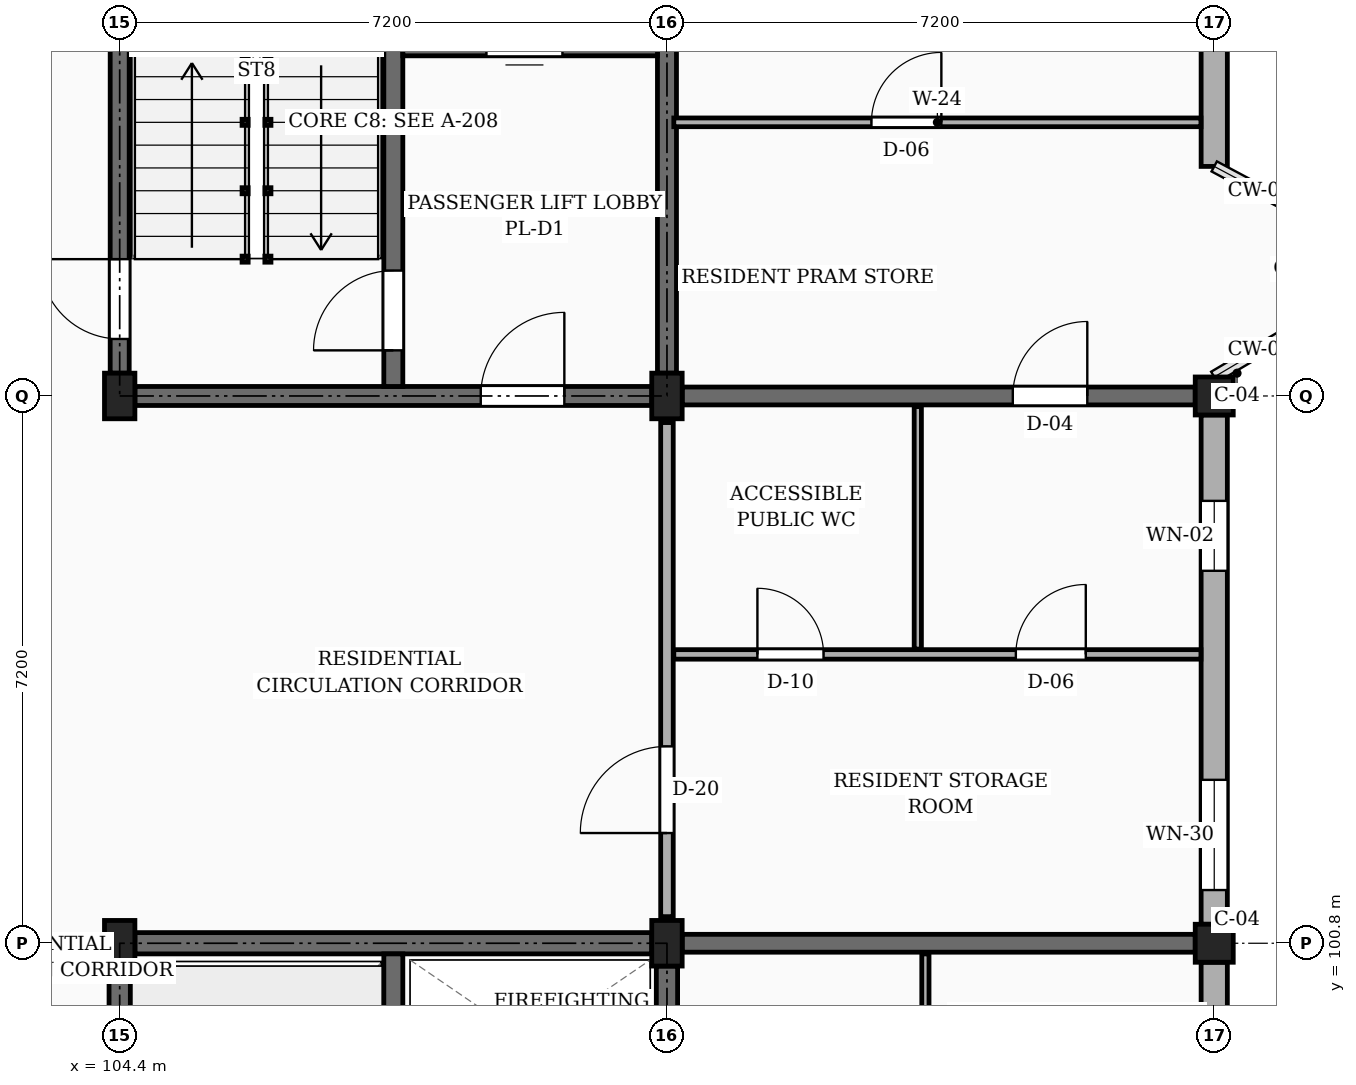
"""IFC4 building model, lengths in metres.
Left out: names, types, materials, properties, quantities, classifications, styles, units other than length and angle.
Written with IfcOpenShell. Run it as: python <this file> out.ifc"""

import sys

from ifc_helpers import new_model, si_unit, direction, frame, frame_2d, origin, origin_2d, place, context, subcontext, project, spatial, rectangle, extrude, element, fill, save


model = new_model("IFC4")
c1 = context("Model", 3, precision=1e-05, world=origin(), true_north=direction((0.0, 1.0)))
c2 = subcontext(c1, "Body", "Model", "MODEL_VIEW")
j1 = project(units=[si_unit("LENGTHUNIT", "METRE"), si_unit("PLANEANGLEUNIT", "RADIAN")], contexts=[c1])
p1 = place(None, origin())
s1 = spatial("IfcSite", under=j1, at=p1, CompositionType="ELEMENT")
p2 = place(p1, origin())
s2 = spatial("IfcBuilding", under=s1, at=p2, CompositionType="ELEMENT")
p3 = place(p2, frame((0.0, 0.0, 23.4)))
s3 = spatial("IfcBuildingStorey", under=s2, at=p3, CompositionType="ELEMENT", Elevation=23.4)
for number, where, z_axis, x_axis in (
    (1, (104.4, 100.8, 0.0), (0.0, 0.0, 1.0), (1.0, 0.0, 0.0)),
    (2, (104.4, 108.0, 0.0), (0.0, 0.0, 1.0), (1.0, 0.0, 0.0)),
    (3, (111.6, 100.8, 0.0), (0.0, 0.0, 1.0), (1.0, 0.0, 0.0)),
    (4, (111.6, 108.0, 0.0), (0.0, 0.0, 1.0), (1.0, 0.0, 0.0)),
):
    element("IfcColumn", number, at=place(p3, frame(where, z_axis=z_axis, x_axis=x_axis)), inside=s3, PredefinedType="COLUMN", context=c2, shape_type="SweptSolid", body=[
        extrude(rectangle(XDim=0.4, YDim=0.6, at=origin_2d()), origin(), (0.0, 0.0, 1.0), 3.15),
    ])
for number, where, z_axis, x_axis in (
    (5, (118.8, 100.8, 0.0), (0.0, 0.0, 1.0), (1.0, 0.0, 0.0)),
    (6, (118.8, 108.0, 0.0), (0.0, 0.0, 1.0), (1.0, 0.0, 0.0)),
):
    element("IfcColumn", number, at=place(p3, frame(where, z_axis=z_axis, x_axis=x_axis)), inside=s3, PredefinedType="COLUMN", context=c2, shape_type="SweptSolid", body=[
        extrude(rectangle(XDim=0.5, YDim=0.5, at=origin_2d()), origin(), (0.0, 0.0, 1.0), 3.15),
    ])
p4 = place(p3, frame((111.8, 100.8, 0.0), z_axis=(0.0, 0.0, 1.0), x_axis=(1.0, 0.0, 0.0)))
e7 = element("IfcWall", 7, at=p4, inside=s3, PredefinedType="SOLIDWALL", context=c2, shape_type="SweptSolid", body=[
    extrude(rectangle(XDim=6.75, YDim=0.235, at=frame_2d((3.375, 0.0))), origin(), (0.0, 0.0, 1.0), 2.19),
])
p5 = place(p3, frame((111.8, 108.0, 0.0), z_axis=(0.0, 0.0, 1.0), x_axis=(1.0, 0.0, 0.0)))
e8 = element("IfcWall", 8, at=p5, inside=s3, PredefinedType="SOLIDWALL", context=c2, shape_type="SweptSolid", body=[
    extrude(rectangle(XDim=6.75, YDim=0.235, at=frame_2d((3.375, 0.0))), origin(), (0.0, 0.0, 1.0), 2.19),
])
p6 = place(p5, frame((4.35, 0.0, 0.0)))
e9 = element("IfcOpeningElement", 9, at=p6, cuts=e8, PredefinedType="OPENING", context=c2, shape_type="SweptSolid", body=[
    extrude(rectangle(XDim=0.98, YDim=2.12, at=frame_2d((0.49, 1.06))), frame((0.0, 0.127, 0.0), z_axis=(0.0, -1.0, 0.0), x_axis=(1.0, 0.0, 0.0)), (0.0, 0.0, 1.0), 0.255),
])
p7 = place(p3, frame((118.8, 93.85, 0.0), z_axis=(0.0, 0.0, 1.0), x_axis=(0.0, 1.0, 0.0)))
e10 = element("IfcWall", 10, at=p7, inside=s3, PredefinedType="SOLIDWALL", context=c2, shape_type="SweptSolid", body=[
    extrude(rectangle(XDim=6.7, YDim=0.345, at=frame_2d((3.35, 0.0))), origin(), (0.0, 0.0, 1.0), 2.46),
])
p8 = place(p7, frame((0.45, 0.0, 0.78)))
e11 = element("IfcOpeningElement", 11, at=p8, cuts=e10, PredefinedType="OPENING", context=c2, shape_type="SweptSolid", body=[
    extrude(rectangle(XDim=1.25, YDim=1.44, at=frame_2d((0.625, 0.72))), frame((0.0, 0.183, 0.0), z_axis=(0.0, -1.0, 0.0), x_axis=(1.0, 0.0, 0.0)), (0.0, 0.0, 1.0), 0.365),
])
p9 = place(p7, frame((4.65, 0.0, 0.78)))
e12 = element("IfcOpeningElement", 12, at=p9, cuts=e10, PredefinedType="OPENING", context=c2, shape_type="SweptSolid", body=[
    extrude(rectangle(XDim=1.45, YDim=1.44, at=frame_2d((0.725, 0.72))), frame((0.0, 0.183, 0.0), z_axis=(0.0, -1.0, 0.0), x_axis=(1.0, 0.0, 0.0)), (0.0, 0.0, 1.0), 0.365),
])
p10 = place(p3, frame((118.8, 101.05, 0.0), z_axis=(0.0, 0.0, 1.0), x_axis=(0.0, 1.0, 0.0)))
e13 = element("IfcWall", 13, at=p10, inside=s3, PredefinedType="SOLIDWALL", context=c2, shape_type="SweptSolid", body=[
    extrude(rectangle(XDim=6.7, YDim=0.345, at=frame_2d((3.35, 0.0))), origin(), (0.0, 0.0, 1.0), 2.46),
])
p11 = place(p10, frame((0.45, 0.0, 0.78)))
e14 = element("IfcOpeningElement", 14, at=p11, cuts=e13, PredefinedType="OPENING", context=c2, shape_type="SweptSolid", body=[
    extrude(rectangle(XDim=1.45, YDim=1.44, at=frame_2d((0.725, 0.72))), frame((0.0, 0.183, 0.0), z_axis=(0.0, -1.0, 0.0), x_axis=(1.0, 0.0, 0.0)), (0.0, 0.0, 1.0), 0.365),
])
p12 = place(p10, frame((4.65, 0.0, 0.78)))
e15 = element("IfcOpeningElement", 15, at=p12, cuts=e13, PredefinedType="OPENING", context=c2, shape_type="SweptSolid", body=[
    extrude(rectangle(XDim=0.92, YDim=1.15, at=frame_2d((0.46, 0.575))), frame((0.0, 0.183, 0.0), z_axis=(0.0, -1.0, 0.0), x_axis=(1.0, 0.0, 0.0)), (0.0, 0.0, 1.0), 0.365),
])
p13 = place(p3, frame((118.8, 111.02, 0.0), z_axis=(0.0, 0.0, 1.0), x_axis=(0.0, 1.0, 0.0)))
e16 = element("IfcWall", 16, at=p13, inside=s3, PredefinedType="SOLIDWALL", context=c2, shape_type="SweptSolid", body=[
    extrude(rectangle(XDim=3.93, YDim=0.345, at=frame_2d((1.965, 0.0))), origin(), (0.0, 0.0, 1.0), 2.46),
])
p14 = place(p13, frame((1.74, 0.0, 0.78)))
e17 = element("IfcOpeningElement", 17, at=p14, cuts=e16, PredefinedType="OPENING", context=c2, shape_type="SweptSolid", body=[
    extrude(rectangle(XDim=0.92, YDim=1.15, at=frame_2d((0.46, 0.575))), frame((0.0, 0.183, 0.0), z_axis=(0.0, -1.0, 0.0), x_axis=(1.0, 0.0, 0.0)), (0.0, 0.0, 1.0), 0.365),
])
p15 = place(p3, frame((104.4, 93.9, 0.0), z_axis=(0.0, 0.0, 1.0), x_axis=(0.0, 1.0, 0.0)))
e18 = element("IfcWall", 18, at=p15, inside=s3, PredefinedType="SHEAR", context=c2, shape_type="SweptSolid", body=[
    extrude(rectangle(XDim=6.6, YDim=0.28, at=frame_2d((3.3, 0.0))), origin(), (0.0, 0.0, 1.0), 2.89),
])
p16 = place(p15, frame((0.45, 0.0, 0.0)))
e19 = element("IfcOpeningElement", 19, at=p16, cuts=e18, PredefinedType="OPENING", context=c2, shape_type="SweptSolid", body=[
    extrude(rectangle(XDim=1.05, YDim=2.15, at=frame_2d((0.525, 1.075))), frame((0.0, 0.15, 0.0), z_axis=(0.0, -1.0, 0.0), x_axis=(1.0, 0.0, 0.0)), (0.0, 0.0, 1.0), 0.3),
])
p17 = place(p3, frame((104.6, 100.8, 0.0), z_axis=(0.0, 0.0, 1.0), x_axis=(1.0, 0.0, 0.0)))
e20 = element("IfcWall", 20, at=p17, inside=s3, PredefinedType="SHEAR", context=c2, shape_type="SweptSolid", body=[
    extrude(rectangle(XDim=6.8, YDim=0.28, at=frame_2d((3.4, 0.0))), origin(), (0.0, 0.0, 1.0), 2.89),
])
p18 = place(p3, frame((111.6, 93.9, 0.0), z_axis=(0.0, 0.0, 1.0), x_axis=(0.0, 1.0, 0.0)))
e21 = element("IfcWall", 21, at=p18, inside=s3, PredefinedType="SHEAR", context=c2, shape_type="SweptSolid", body=[
    extrude(rectangle(XDim=6.6, YDim=0.28, at=frame_2d((3.3, 0.0))), origin(), (0.0, 0.0, 1.0), 2.89),
])
p19 = place(p3, frame((108.0, 93.74, 0.0), z_axis=(0.0, 0.0, 1.0), x_axis=(0.0, 1.0, 0.0)))
e22 = element("IfcWall", 22, at=p19, inside=s3, PredefinedType="SHEAR", context=c2, shape_type="SweptSolid", body=[
    extrude(rectangle(XDim=6.92, YDim=0.25, at=frame_2d((3.46, 0.0))), origin(), (0.0, 0.0, 1.0), 2.89),
])
p20 = place(p19, frame((0.46, 0.0, 0.0)))
e23 = element("IfcOpeningElement", 23, at=p20, cuts=e22, PredefinedType="OPENING", context=c2, shape_type="SweptSolid", body=[
    extrude(rectangle(XDim=1.05, YDim=2.15, at=frame_2d((0.525, 1.075))), frame((0.0, 0.135, 0.0), z_axis=(0.0, -1.0, 0.0), x_axis=(1.0, 0.0, 0.0)), (0.0, 0.0, 1.0), 0.27),
])
p21 = place(p3, frame((104.4, 108.3, 0.0), z_axis=(0.0, 0.0, 1.0), x_axis=(0.0, 1.0, 0.0)))
e24 = element("IfcWall", 24, at=p21, inside=s3, PredefinedType="SHEAR", context=c2, shape_type="SweptSolid", body=[
    extrude(rectangle(XDim=6.6, YDim=0.25, at=frame_2d((3.3, 0.0))), origin(), (0.0, 0.0, 1.0), 2.89),
])
p22 = place(p21, frame((0.45, 0.0, 0.0)))
e25 = element("IfcOpeningElement", 25, at=p22, cuts=e24, PredefinedType="OPENING", context=c2, shape_type="SweptSolid", body=[
    extrude(rectangle(XDim=1.05, YDim=2.15, at=frame_2d((0.525, 1.075))), frame((0.0, 0.135, 0.0), z_axis=(0.0, -1.0, 0.0), x_axis=(1.0, 0.0, 0.0)), (0.0, 0.0, 1.0), 0.27),
])
p23 = place(p3, frame((111.6, 108.3, 0.0), z_axis=(0.0, 0.0, 1.0), x_axis=(0.0, 1.0, 0.0)))
e26 = element("IfcWall", 26, at=p23, inside=s3, PredefinedType="SHEAR", context=c2, shape_type="SweptSolid", body=[
    extrude(rectangle(XDim=6.6, YDim=0.25, at=frame_2d((3.3, 0.0))), origin(), (0.0, 0.0, 1.0), 2.89),
])
p24 = place(p3, frame((104.6, 108.0, 0.0), z_axis=(0.0, 0.0, 1.0), x_axis=(1.0, 0.0, 0.0)))
e27 = element("IfcWall", 27, at=p24, inside=s3, PredefinedType="SHEAR", context=c2, shape_type="SweptSolid", body=[
    extrude(rectangle(XDim=6.8, YDim=0.25, at=frame_2d((3.4, 0.0))), origin(), (0.0, 0.0, 1.0), 2.89),
])
p25 = place(p24, frame((4.55, 0.0, 0.0)))
e28 = element("IfcOpeningElement", 28, at=p25, cuts=e27, PredefinedType="OPENING", context=c2, shape_type="SweptSolid", body=[
    extrude(rectangle(XDim=1.1, YDim=2.15, at=frame_2d((0.55, 1.075))), frame((0.0, 0.135, 0.0), z_axis=(0.0, -1.0, 0.0), x_axis=(1.0, 0.0, 0.0)), (0.0, 0.0, 1.0), 0.27),
])
p26 = place(p3, frame((108.0, 108.125, 0.0), z_axis=(0.0, 0.0, 1.0), x_axis=(0.0, 1.0, 0.0)))
e29 = element("IfcWall", 29, at=p26, inside=s3, PredefinedType="SHEAR", context=c2, shape_type="SweptSolid", body=[
    extrude(rectangle(XDim=6.95, YDim=0.25, at=frame_2d((3.475, 0.0))), origin(), (0.0, 0.0, 1.0), 2.89),
])
p27 = place(p26, frame((0.475, 0.0, 0.0)))
e30 = element("IfcOpeningElement", 30, at=p27, cuts=e29, PredefinedType="OPENING", context=c2, shape_type="SweptSolid", body=[
    extrude(rectangle(XDim=1.05, YDim=2.15, at=frame_2d((0.525, 1.075))), frame((0.0, 0.135, 0.0), z_axis=(0.0, -1.0, 0.0), x_axis=(1.0, 0.0, 0.0)), (0.0, 0.0, 1.0), 0.27),
])
p28 = place(p3, frame((108.125, 112.6, 0.0), z_axis=(0.0, 0.0, 1.0), x_axis=(1.0, 0.0, 0.0)))
e31 = element("IfcWall", 31, at=p28, inside=s3, PredefinedType="SHEAR", context=c2, shape_type="SweptSolid", body=[
    extrude(rectangle(XDim=3.35, YDim=0.25, at=frame_2d((1.675, 0.0))), origin(), (0.0, 0.0, 1.0), 2.89),
])
p29 = place(p28, frame((1.1, 0.0, 0.0)))
e32 = element("IfcOpeningElement", 32, at=p29, cuts=e31, PredefinedType="OPENING", context=c2, shape_type="SweptSolid", body=[
    extrude(rectangle(XDim=1.0, YDim=2.2, at=frame_2d((0.5, 1.1))), frame((0.0, 0.135, 0.0), z_axis=(0.0, -1.0, 0.0), x_axis=(1.0, 0.0, 0.0)), (0.0, 0.0, 1.0), 0.27),
])
p30 = place(p3, frame((111.6, 101.15, 0.0), z_axis=(0.0, 0.0, 1.0), x_axis=(0.0, 1.0, 0.0)))
e33 = element("IfcWall", 33, at=p30, inside=s3, PredefinedType="PARTITIONING", context=c2, shape_type="SweptSolid", body=[
    extrude(rectangle(XDim=6.5, YDim=0.165, at=frame_2d((3.25, 0.0))), origin(), (0.0, 0.0, 1.0), 2.325),
])
p31 = place(p30, frame((1.1, 0.0, 0.0)))
e34 = element("IfcOpeningElement", 34, at=p31, cuts=e33, PredefinedType="OPENING", context=c2, shape_type="SweptSolid", body=[
    extrude(rectangle(XDim=1.14, YDim=2.18, at=frame_2d((0.57, 1.09))), frame((0.0, 0.093, 0.0), z_axis=(0.0, -1.0, 0.0), x_axis=(1.0, 0.0, 0.0)), (0.0, 0.0, 1.0), 0.185),
])
p32 = place(p3, frame((115.0, 96.97, 0.0), z_axis=(0.0, 0.0, 1.0), x_axis=(0.0, 1.0, 0.0)))
e35 = element("IfcWall", 35, at=p32, inside=s3, PredefinedType="PARTITIONING", context=c2, shape_type="SweptSolid", body=[
    extrude(rectangle(XDim=3.69, YDim=0.095, at=frame_2d((1.845, 0.0))), origin(), (0.0, 0.0, 1.0), 2.325),
])
p33 = place(p3, frame((111.69, 104.6, 0.0), z_axis=(0.0, 0.0, 1.0), x_axis=(1.0, 0.0, 0.0)))
e36 = element("IfcWall", 36, at=p33, inside=s3, PredefinedType="PARTITIONING", context=c2, shape_type="SweptSolid", body=[
    extrude(rectangle(XDim=6.935, YDim=0.125, at=frame_2d((3.468, 0.0))), origin(), (0.0, 0.0, 1.0), 2.325),
])
p34 = place(p33, frame((1.1, 0.0, 0.0)))
e37 = element("IfcOpeningElement", 37, at=p34, cuts=e36, PredefinedType="OPENING", context=c2, shape_type="SweptSolid", body=[
    extrude(rectangle(XDim=0.87, YDim=2.05, at=frame_2d((0.435, 1.025))), frame((0.0, 0.073, 0.0), z_axis=(0.0, -1.0, 0.0), x_axis=(1.0, 0.0, 0.0)), (0.0, 0.0, 1.0), 0.145),
])
p35 = place(p33, frame((4.5, 0.0, 0.0)))
e38 = element("IfcOpeningElement", 38, at=p35, cuts=e36, PredefinedType="OPENING", context=c2, shape_type="SweptSolid", body=[
    extrude(rectangle(XDim=0.92, YDim=2.1, at=frame_2d((0.46, 1.05))), frame((0.0, 0.073, 0.0), z_axis=(0.0, -1.0, 0.0), x_axis=(1.0, 0.0, 0.0)), (0.0, 0.0, 1.0), 0.145),
])
p36 = place(p3, frame((114.9, 104.67, 0.0), z_axis=(0.0, 0.0, 1.0), x_axis=(0.0, 1.0, 0.0)))
e39 = element("IfcWall", 39, at=p36, inside=s3, PredefinedType="PARTITIONING", context=c2, shape_type="SweptSolid", body=[
    extrude(rectangle(XDim=3.19, YDim=0.095, at=frame_2d((1.595, 0.0))), origin(), (0.0, 0.0, 1.0), 2.325),
])
p37 = place(p3, frame((111.69, 111.6, 0.0), z_axis=(0.0, 0.0, 1.0), x_axis=(1.0, 0.0, 0.0)))
e40 = element("IfcWall", 40, at=p37, inside=s3, PredefinedType="PARTITIONING", context=c2, shape_type="SweptSolid", body=[
    extrude(rectangle(XDim=6.935, YDim=0.115, at=frame_2d((3.468, 0.0))), origin(), (0.0, 0.0, 1.0), 2.325),
])
p38 = place(p37, frame((2.6, 0.0, 0.0)))
e41 = element("IfcOpeningElement", 41, at=p38, cuts=e40, PredefinedType="OPENING", context=c2, shape_type="SweptSolid", body=[
    extrude(rectangle(XDim=0.92, YDim=2.1, at=frame_2d((0.46, 1.05))), frame((0.0, 0.067, 0.0), z_axis=(0.0, -1.0, 0.0), x_axis=(1.0, 0.0, 0.0)), (0.0, 0.0, 1.0), 0.135),
])
p39 = place(p11, origin())
e42 = element("IfcWindow", 42, at=p39, inside=s3, PartitioningType="SINGLE_PANEL", PredefinedType="WINDOW", context=c2, shape_type="SweptSolid", body=[
    extrude(rectangle(XDim=1.45, YDim=1.44, at=frame_2d((0.725, 0.72))), frame((0.0, 0.03, 0.0), z_axis=(0.0, -1.0, 0.0), x_axis=(1.0, 0.0, 0.0)), (0.0, 0.0, 1.0), 0.06),
])
fill(e14, e42)
p40 = place(p12, origin())
e43 = element("IfcWindow", 43, at=p40, inside=s3, PartitioningType="SINGLE_PANEL", PredefinedType="WINDOW", context=c2, shape_type="SweptSolid", body=[
    extrude(rectangle(XDim=0.92, YDim=1.15, at=frame_2d((0.46, 0.575))), frame((0.0, 0.03, 0.0), z_axis=(0.0, -1.0, 0.0), x_axis=(1.0, 0.0, 0.0)), (0.0, 0.0, 1.0), 0.06),
])
fill(e15, e43)
p41 = place(p22, origin())
e44 = element("IfcDoor", 44, at=p41, inside=s3, OperationType="SINGLE_SWING_RIGHT", PredefinedType="DOOR", context=c2, shape_type="SweptSolid", body=[
    extrude(rectangle(XDim=1.05, YDim=2.15, at=frame_2d((0.525, 1.075))), frame((0.0, 0.025, 0.0), z_axis=(0.0, -1.0, 0.0), x_axis=(1.0, 0.0, 0.0)), (0.0, 0.0, 1.0), 0.05),
])
fill(e25, e44)
p42 = place(p25, frame((1.1, 0.0, 0.0), z_axis=(0.0, 0.0, 1.0), x_axis=(-1.0, 0.0, 0.0)))
e45 = element("IfcDoor", 45, at=p42, inside=s3, OperationType="SINGLE_SWING_RIGHT", PredefinedType="DOOR", context=c2, shape_type="SweptSolid", body=[
    extrude(rectangle(XDim=1.1, YDim=2.15, at=frame_2d((0.55, 1.075))), frame((0.0, 0.025, 0.0), z_axis=(0.0, -1.0, 0.0), x_axis=(1.0, 0.0, 0.0)), (0.0, 0.0, 1.0), 0.05),
])
fill(e28, e45)
p43 = place(p27, origin())
e46 = element("IfcDoor", 46, at=p43, inside=s3, OperationType="SINGLE_SWING_LEFT", PredefinedType="DOOR", context=c2, shape_type="SweptSolid", body=[
    extrude(rectangle(XDim=1.05, YDim=2.15, at=frame_2d((0.525, 1.075))), frame((0.0, 0.025, 0.0), z_axis=(0.0, -1.0, 0.0), x_axis=(1.0, 0.0, 0.0)), (0.0, 0.0, 1.0), 0.05),
])
fill(e30, e46)
p44 = place(p31, origin())
e47 = element("IfcDoor", 47, at=p44, inside=s3, OperationType="SINGLE_SWING_LEFT", PredefinedType="DOOR", context=c2, shape_type="SweptSolid", body=[
    extrude(rectangle(XDim=1.14, YDim=2.18, at=frame_2d((0.57, 1.09))), frame((0.0, 0.025, 0.0), z_axis=(0.0, -1.0, 0.0), x_axis=(1.0, 0.0, 0.0)), (0.0, 0.0, 1.0), 0.05),
])
fill(e34, e47)
p45 = place(p34, origin())
e48 = element("IfcDoor", 48, at=p45, inside=s3, OperationType="SINGLE_SWING_LEFT", PredefinedType="DOOR", context=c2, shape_type="SweptSolid", body=[
    extrude(rectangle(XDim=0.87, YDim=2.05, at=frame_2d((0.435, 1.025))), frame((0.0, 0.025, 0.0), z_axis=(0.0, -1.0, 0.0), x_axis=(1.0, 0.0, 0.0)), (0.0, 0.0, 1.0), 0.05),
])
fill(e37, e48)
p46 = place(p35, origin())
e49 = element("IfcDoor", 49, at=p46, inside=s3, OperationType="SINGLE_SWING_RIGHT", PredefinedType="DOOR", context=c2, shape_type="SweptSolid", body=[
    extrude(rectangle(XDim=0.92, YDim=2.1, at=frame_2d((0.46, 1.05))), frame((0.0, 0.025, 0.0), z_axis=(0.0, -1.0, 0.0), x_axis=(1.0, 0.0, 0.0)), (0.0, 0.0, 1.0), 0.05),
])
fill(e38, e49)
p47 = place(p38, origin())
e50 = element("IfcDoor", 50, at=p47, inside=s3, OperationType="SINGLE_SWING_RIGHT", PredefinedType="DOOR", context=c2, shape_type="SweptSolid", body=[
    extrude(rectangle(XDim=0.92, YDim=2.1, at=frame_2d((0.46, 1.05))), frame((0.0, 0.025, 0.0), z_axis=(0.0, -1.0, 0.0), x_axis=(1.0, 0.0, 0.0)), (0.0, 0.0, 1.0), 0.05),
])
fill(e41, e50)
p48 = place(p6, origin())
e51 = element("IfcDoor", 51, at=p48, inside=s3, OperationType="SINGLE_SWING_RIGHT", PredefinedType="DOOR", context=c2, shape_type="SweptSolid", body=[
    extrude(rectangle(XDim=0.98, YDim=2.12, at=frame_2d((0.49, 1.06))), frame((0.0, 0.025, 0.0), z_axis=(0.0, -1.0, 0.0), x_axis=(1.0, 0.0, 0.0)), (0.0, 0.0, 1.0), 0.05),
])
fill(e9, e51)
save(model, sys.argv[1])
